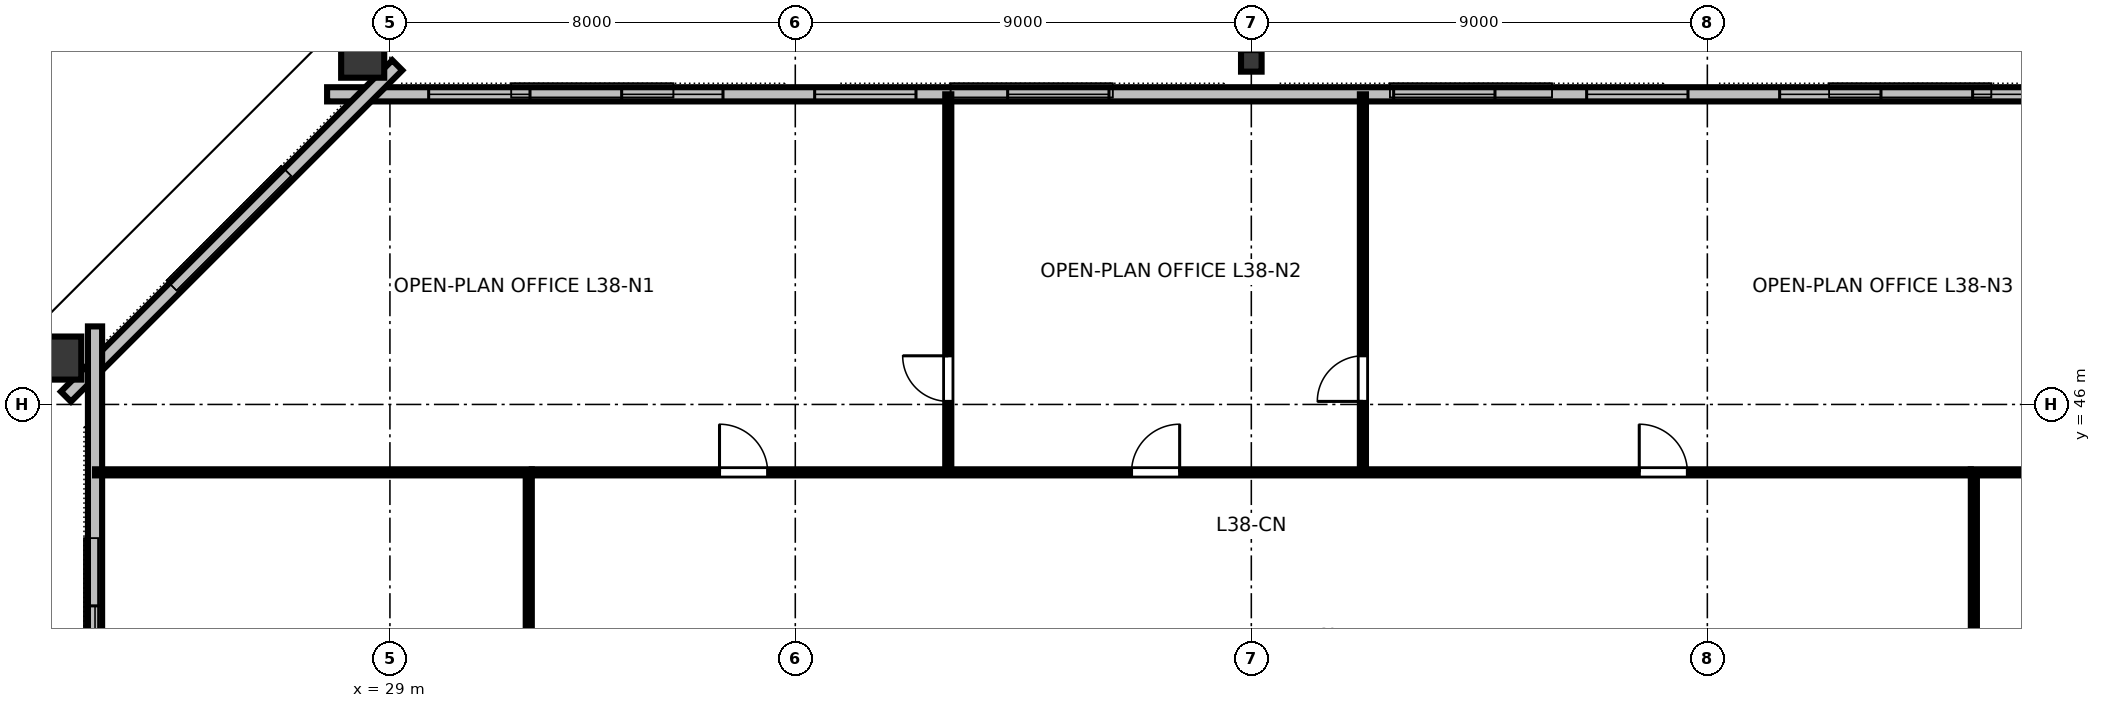
"""IFC4 building model, lengths in metres.
Left out: names, types, materials, properties, quantities, classifications, styles, units other than length and angle.
Written with IfcOpenShell. Run it as: python <this file> out.ifc"""

import sys

from ifc_helpers import new_model, si_unit, direction, frame, frame_2d, origin, origin_2d, place, context, subcontext, project, spatial, rectangle, hollow_rectangle, i_section, extrude, element, fill, save


model = new_model("IFC4")
c1 = context("Model", 3, precision=1e-05, world=origin(), true_north=direction((0.0, 1.0)))
c2 = subcontext(c1, "Body", "Model", "MODEL_VIEW")
j1 = project(units=[si_unit("LENGTHUNIT", "METRE"), si_unit("PLANEANGLEUNIT", "RADIAN")], contexts=[c1])
p1 = place(None, origin())
s1 = spatial("IfcSite", under=j1, at=p1, CompositionType="ELEMENT")
p2 = place(p1, origin())
s2 = spatial("IfcBuilding", under=s1, at=p2, CompositionType="ELEMENT")
p3 = place(p2, frame((0.0, 0.0, 145.6)))
s3 = spatial("IfcBuildingStorey", under=s2, at=p3, CompositionType="ELEMENT", Elevation=145.6)
p4 = place(p3, frame((46.0, 52.78, 0.0), z_axis=(0.0, 0.074245582927, 0.997239987874), x_axis=(-1.0, 0.0, 0.0)))
e1 = element("IfcColumn", 1, at=p4, inside=s3, PredefinedType="COLUMN", context=c2, shape_type="SweptSolid", body=[
    extrude(i_section(OverallWidth=0.406, OverallDepth=0.425, WebThickness=0.033, FlangeThickness=0.052, FilletRadius=0.025, at=origin_2d()), origin(), (0.0, 0.0, 1.0), 3.367),
])
p5 = place(p3, frame((28.462, 52.948, 0.0), z_axis=(-0.059277862286, 0.074043044101, 0.995491719033), x_axis=(-0.780645414878, -0.624974188451, 0.0)))
e2 = element("IfcColumn", 2, at=p5, inside=s3, PredefinedType="COLUMN", context=c2, shape_type="SweptSolid", body=[
    extrude(hollow_rectangle(XDim=0.85, YDim=1.0, WallThickness=0.05, at=origin_2d()), origin(), (0.0, 0.0, 1.0), 3.373),
])
p6 = place(p3, frame((22.409, 46.915, 0.0), z_axis=(-0.088840732105, 0.044637403672, 0.995045137927), x_axis=(0.889124879538, -0.446734568954, 0.099424209766)))
e3 = element("IfcColumn", 3, at=p6, inside=s3, PredefinedType="COLUMN", context=c2, shape_type="SweptSolid", body=[
    extrude(hollow_rectangle(XDim=0.85, YDim=1.0, WallThickness=0.05, at=origin_2d()), origin(), (0.0, 0.0, 1.0), 3.375),
])
p7 = place(p3, frame((64.24, 52.12, 0.0), z_axis=(0.0, 0.0, 1.0), x_axis=(-1.0, 0.0, 0.0)))
e4 = element("IfcWall", 4, at=p7, inside=s3, PredefinedType="STANDARD", context=c2, shape_type="SweptSolid", body=[
    extrude(rectangle(XDim=36.48, YDim=0.28, at=frame_2d((18.24, 0.0))), origin(), (0.0, 0.0, 1.0), 3.36),
])
p8 = place(p7, frame((2.004, 0.0, 0.8)))
e5 = element("IfcOpeningElement", 5, at=p8, cuts=e4, PredefinedType="OPENING", context=c2, shape_type="SweptSolid", body=[
    extrude(rectangle(XDim=2.0, YDim=1.95, at=frame_2d((1.0, 0.975))), frame((0.0, 0.15, 0.0), z_axis=(0.0, -1.0, 0.0), x_axis=(1.0, 0.0, 0.0)), (0.0, 0.0, 1.0), 0.3),
])
p9 = place(p7, frame((5.813, 0.0, 0.8)))
e6 = element("IfcOpeningElement", 6, at=p9, cuts=e4, PredefinedType="OPENING", context=c2, shape_type="SweptSolid", body=[
    extrude(rectangle(XDim=2.0, YDim=1.95, at=frame_2d((1.0, 0.975))), frame((0.0, 0.15, 0.0), z_axis=(0.0, -1.0, 0.0), x_axis=(1.0, 0.0, 0.0)), (0.0, 0.0, 1.0), 0.3),
])
p10 = place(p7, frame((9.622, 0.0, 0.8)))
e7 = element("IfcOpeningElement", 7, at=p10, cuts=e4, PredefinedType="OPENING", context=c2, shape_type="SweptSolid", body=[
    extrude(rectangle(XDim=2.0, YDim=1.95, at=frame_2d((1.0, 0.975))), frame((0.0, 0.15, 0.0), z_axis=(0.0, -1.0, 0.0), x_axis=(1.0, 0.0, 0.0)), (0.0, 0.0, 1.0), 0.3),
])
p11 = place(p7, frame((13.431, 0.0, 0.8)))
e8 = element("IfcOpeningElement", 8, at=p11, cuts=e4, PredefinedType="OPENING", context=c2, shape_type="SweptSolid", body=[
    extrude(rectangle(XDim=2.0, YDim=1.95, at=frame_2d((1.0, 0.975))), frame((0.0, 0.15, 0.0), z_axis=(0.0, -1.0, 0.0), x_axis=(1.0, 0.0, 0.0)), (0.0, 0.0, 1.0), 0.3),
])
p12 = place(p7, frame((21.049, 0.0, 0.8)))
e9 = element("IfcOpeningElement", 9, at=p12, cuts=e4, PredefinedType="OPENING", context=c2, shape_type="SweptSolid", body=[
    extrude(rectangle(XDim=2.0, YDim=1.95, at=frame_2d((1.0, 0.975))), frame((0.0, 0.15, 0.0), z_axis=(0.0, -1.0, 0.0), x_axis=(1.0, 0.0, 0.0)), (0.0, 0.0, 1.0), 0.3),
])
p13 = place(p7, frame((24.858, 0.0, 0.8)))
e10 = element("IfcOpeningElement", 10, at=p13, cuts=e4, PredefinedType="OPENING", context=c2, shape_type="SweptSolid", body=[
    extrude(rectangle(XDim=2.0, YDim=1.95, at=frame_2d((1.0, 0.975))), frame((0.0, 0.15, 0.0), z_axis=(0.0, -1.0, 0.0), x_axis=(1.0, 0.0, 0.0)), (0.0, 0.0, 1.0), 0.3),
])
p14 = place(p7, frame((28.667, 0.0, 0.8)))
e11 = element("IfcOpeningElement", 11, at=p14, cuts=e4, PredefinedType="OPENING", context=c2, shape_type="SweptSolid", body=[
    extrude(rectangle(XDim=2.0, YDim=1.95, at=frame_2d((1.0, 0.975))), frame((0.0, 0.15, 0.0), z_axis=(0.0, -1.0, 0.0), x_axis=(1.0, 0.0, 0.0)), (0.0, 0.0, 1.0), 0.3),
])
p15 = place(p7, frame((32.476, 0.0, 0.8)))
e12 = element("IfcOpeningElement", 12, at=p15, cuts=e4, PredefinedType="OPENING", context=c2, shape_type="SweptSolid", body=[
    extrude(rectangle(XDim=2.0, YDim=1.95, at=frame_2d((1.0, 0.975))), frame((0.0, 0.15, 0.0), z_axis=(0.0, -1.0, 0.0), x_axis=(1.0, 0.0, 0.0)), (0.0, 0.0, 1.0), 0.3),
])
p16 = place(p3, frame((29.146, 52.694, 0.0), z_axis=(0.0, 0.0, 1.0), x_axis=(-0.707106781187, -0.707106781187, 0.0)))
e13 = element("IfcWall", 13, at=p16, inside=s3, PredefinedType="STANDARD", context=c2, shape_type="SweptSolid", body=[
    extrude(rectangle(XDim=9.248, YDim=0.28, at=frame_2d((4.624, 0.0))), origin(), (0.0, 0.0, 1.0), 3.36),
])
p17 = place(p3, frame((23.18, 47.54, 0.0), z_axis=(0.0, 0.0, 1.0), x_axis=(0.0, -1.0, 0.0)))
e14 = element("IfcWall", 14, at=p17, inside=s3, PredefinedType="STANDARD", context=c2, shape_type="SweptSolid", body=[
    extrude(rectangle(XDim=31.08, YDim=0.28, at=frame_2d((15.54, 0.0))), origin(), (0.0, 0.0, 1.0), 3.36),
])
p18 = place(p17, frame((11.86, 0.0, 0.0)))
e15 = element("IfcOpeningElement", 15, at=p18, cuts=e14, PredefinedType="OPENING", context=c2, shape_type="SweptSolid", body=[
    extrude(rectangle(XDim=1.4, YDim=2.15, at=frame_2d((0.7, 1.075))), frame((0.0, 0.15, 0.0), z_axis=(0.0, -1.0, 0.0), x_axis=(1.0, 0.0, 0.0)), (0.0, 0.0, 1.0), 0.3),
])
p19 = place(p17, frame((5.515, 0.0, 0.8)))
e16 = element("IfcOpeningElement", 16, at=p19, cuts=e14, PredefinedType="OPENING", context=c2, shape_type="SweptSolid", body=[
    extrude(rectangle(XDim=2.0, YDim=1.95, at=frame_2d((1.0, 0.975))), frame((0.0, 0.15, 0.0), z_axis=(0.0, -1.0, 0.0), x_axis=(1.0, 0.0, 0.0)), (0.0, 0.0, 1.0), 0.3),
])
p20 = place(p17, frame((9.125, 0.0, 0.8)))
e17 = element("IfcOpeningElement", 17, at=p20, cuts=e14, PredefinedType="OPENING", context=c2, shape_type="SweptSolid", body=[
    extrude(rectangle(XDim=2.0, YDim=1.95, at=frame_2d((1.0, 0.975))), frame((0.0, 0.15, 0.0), z_axis=(0.0, -1.0, 0.0), x_axis=(1.0, 0.0, 0.0)), (0.0, 0.0, 1.0), 0.3),
])
p21 = place(p17, frame((19.955, 0.0, 0.8)))
e18 = element("IfcOpeningElement", 18, at=p21, cuts=e14, PredefinedType="OPENING", context=c2, shape_type="SweptSolid", body=[
    extrude(rectangle(XDim=2.0, YDim=1.95, at=frame_2d((1.0, 0.975))), frame((0.0, 0.15, 0.0), z_axis=(0.0, -1.0, 0.0), x_axis=(1.0, 0.0, 0.0)), (0.0, 0.0, 1.0), 0.3),
])
p22 = place(p17, frame((23.565, 0.0, 0.8)))
e19 = element("IfcOpeningElement", 19, at=p22, cuts=e14, PredefinedType="OPENING", context=c2, shape_type="SweptSolid", body=[
    extrude(rectangle(XDim=2.0, YDim=1.95, at=frame_2d((1.0, 0.975))), frame((0.0, 0.15, 0.0), z_axis=(0.0, -1.0, 0.0), x_axis=(1.0, 0.0, 0.0)), (0.0, 0.0, 1.0), 0.3),
])
p23 = place(p3, frame((40.019, 44.66, 0.0), z_axis=(0.0, 0.0, 1.0), x_axis=(0.0, 1.0, 0.0)))
e20 = element("IfcWall", 20, at=p23, inside=s3, PredefinedType="PARTITIONING", context=c2, shape_type="SweptSolid", body=[
    extrude(rectangle(XDim=7.46, YDim=0.12, at=frame_2d((3.73, 0.0))), origin(), (0.0, 0.0, 1.0), 2.64),
])
p24 = place(p23, frame((1.4, 0.0, 0.0)))
e21 = element("IfcOpeningElement", 21, at=p24, cuts=e20, PredefinedType="OPENING", context=c2, shape_type="SweptSolid", body=[
    extrude(rectangle(XDim=0.9, YDim=2.15, at=frame_2d((0.45, 1.075))), frame((0.0, 0.07, 0.0), z_axis=(0.0, -1.0, 0.0), x_axis=(1.0, 0.0, 0.0)), (0.0, 0.0, 1.0), 0.14),
])
p25 = place(p3, frame((48.202, 44.66, 0.0), z_axis=(0.0, 0.0, 1.0), x_axis=(0.0, 1.0, 0.0)))
e22 = element("IfcWall", 22, at=p25, inside=s3, PredefinedType="PARTITIONING", context=c2, shape_type="SweptSolid", body=[
    extrude(rectangle(XDim=7.46, YDim=0.12, at=frame_2d((3.73, 0.0))), origin(), (0.0, 0.0, 1.0), 2.64),
])
p26 = place(p25, frame((1.4, 0.0, 0.0)))
e23 = element("IfcOpeningElement", 23, at=p26, cuts=e22, PredefinedType="OPENING", context=c2, shape_type="SweptSolid", body=[
    extrude(rectangle(XDim=0.9, YDim=2.15, at=frame_2d((0.45, 1.075))), frame((0.0, 0.07, 0.0), z_axis=(0.0, -1.0, 0.0), x_axis=(1.0, 0.0, 0.0)), (0.0, 0.0, 1.0), 0.14),
])
p27 = place(p3, frame((31.8, 44.66, 0.0), z_axis=(0.0, 0.0, 1.0), x_axis=(1.0, 0.0, 0.0)))
e24 = element("IfcWall", 24, at=p27, inside=s3, PredefinedType="PARTITIONING", context=c2, shape_type="SweptSolid", body=[
    extrude(rectangle(XDim=28.4, YDim=0.12, at=frame_2d((14.2, 0.0))), origin(), (0.0, 0.0, 1.0), 2.64),
])
p28 = place(p27, frame((3.705, 0.0, 0.0)))
e25 = element("IfcOpeningElement", 25, at=p28, cuts=e24, PredefinedType="OPENING", context=c2, shape_type="SweptSolid", body=[
    extrude(rectangle(XDim=0.95, YDim=2.15, at=frame_2d((0.475, 1.075))), frame((0.0, 0.07, 0.0), z_axis=(0.0, -1.0, 0.0), x_axis=(1.0, 0.0, 0.0)), (0.0, 0.0, 1.0), 0.14),
])
p29 = place(p27, frame((11.836, 0.0, 0.0)))
e26 = element("IfcOpeningElement", 26, at=p29, cuts=e24, PredefinedType="OPENING", context=c2, shape_type="SweptSolid", body=[
    extrude(rectangle(XDim=0.95, YDim=2.15, at=frame_2d((0.475, 1.075))), frame((0.0, 0.07, 0.0), z_axis=(0.0, -1.0, 0.0), x_axis=(1.0, 0.0, 0.0)), (0.0, 0.0, 1.0), 0.14),
])
p30 = place(p27, frame((21.856, 0.0, 0.0)))
e27 = element("IfcOpeningElement", 27, at=p30, cuts=e24, PredefinedType="OPENING", context=c2, shape_type="SweptSolid", body=[
    extrude(rectangle(XDim=0.95, YDim=2.15, at=frame_2d((0.475, 1.075))), frame((0.0, 0.07, 0.0), z_axis=(0.0, -1.0, 0.0), x_axis=(1.0, 0.0, 0.0)), (0.0, 0.0, 1.0), 0.14),
])
p31 = place(p3, frame((31.74, 33.02, 0.0), z_axis=(0.0, 0.0, 1.0), x_axis=(0.0, 1.0, 0.0)))
e28 = element("IfcWall", 28, at=p31, inside=s3, PredefinedType="PARTITIONING", context=c2, shape_type="SweptSolid", body=[
    extrude(rectangle(XDim=11.58, YDim=0.12, at=frame_2d((5.79, 0.0))), origin(), (0.0, 0.0, 1.0), 2.64),
])
p32 = place(p31, frame((5.215, 0.0, 0.0)))
e29 = element("IfcOpeningElement", 29, at=p32, cuts=e28, PredefinedType="OPENING", context=c2, shape_type="SweptSolid", body=[
    extrude(rectangle(XDim=0.95, YDim=2.15, at=frame_2d((0.475, 1.075))), frame((0.0, 0.07, 0.0), z_axis=(0.0, -1.0, 0.0), x_axis=(1.0, 0.0, 0.0)), (0.0, 0.0, 1.0), 0.14),
])
p33 = place(p3, frame((60.26, 33.02, 0.0), z_axis=(0.0, 0.0, 1.0), x_axis=(0.0, 1.0, 0.0)))
e30 = element("IfcWall", 30, at=p33, inside=s3, PredefinedType="PARTITIONING", context=c2, shape_type="SweptSolid", body=[
    extrude(rectangle(XDim=11.58, YDim=0.12, at=frame_2d((5.79, 0.0))), origin(), (0.0, 0.0, 1.0), 2.64),
])
p34 = place(p33, frame((5.775, 0.0, 0.0)))
e31 = element("IfcOpeningElement", 31, at=p34, cuts=e30, PredefinedType="OPENING", context=c2, shape_type="SweptSolid", body=[
    extrude(rectangle(XDim=0.95, YDim=2.15, at=frame_2d((0.475, 1.075))), frame((0.0, 0.07, 0.0), z_axis=(0.0, -1.0, 0.0), x_axis=(1.0, 0.0, 0.0)), (0.0, 0.0, 1.0), 0.14),
])
for number, where, z_axis, x_axis in (
    (32, (31.8, 44.66, 0.0), (0.0, 0.0, 1.0), (-1.0, 0.0, 0.0)),
    (33, (60.2, 44.66, 0.0), (0.0, 0.0, 1.0), (1.0, 0.0, 0.0)),
):
    element("IfcWall", number, at=place(p3, frame(where, z_axis=z_axis, x_axis=x_axis)), inside=s3, PredefinedType="PARTITIONING", context=c2, shape_type="SweptSolid", body=[
        extrude(rectangle(XDim=8.62, YDim=0.12, at=frame_2d((4.31, 0.0))), origin(), (0.0, 0.0, 1.0), 2.64),
    ])
p35 = place(p8, origin())
e34 = element("IfcWindow", 34, at=p35, inside=s3, PartitioningType="SINGLE_PANEL", PredefinedType="WINDOW", context=c2, shape_type="SweptSolid", body=[
    extrude(rectangle(XDim=2.0, YDim=1.95, at=frame_2d((1.0, 0.975))), frame((0.0, 0.03, 0.0), z_axis=(0.0, -1.0, 0.0), x_axis=(1.0, 0.0, 0.0)), (0.0, 0.0, 1.0), 0.06),
])
fill(e5, e34)
p36 = place(p9, origin())
e35 = element("IfcWindow", 35, at=p36, inside=s3, PartitioningType="SINGLE_PANEL", PredefinedType="WINDOW", context=c2, shape_type="SweptSolid", body=[
    extrude(rectangle(XDim=2.0, YDim=1.95, at=frame_2d((1.0, 0.975))), frame((0.0, 0.03, 0.0), z_axis=(0.0, -1.0, 0.0), x_axis=(1.0, 0.0, 0.0)), (0.0, 0.0, 1.0), 0.06),
])
fill(e6, e35)
p37 = place(p10, origin())
e36 = element("IfcWindow", 36, at=p37, inside=s3, PartitioningType="SINGLE_PANEL", PredefinedType="WINDOW", context=c2, shape_type="SweptSolid", body=[
    extrude(rectangle(XDim=2.0, YDim=1.95, at=frame_2d((1.0, 0.975))), frame((0.0, 0.03, 0.0), z_axis=(0.0, -1.0, 0.0), x_axis=(1.0, 0.0, 0.0)), (0.0, 0.0, 1.0), 0.06),
])
fill(e7, e36)
p38 = place(p11, origin())
e37 = element("IfcWindow", 37, at=p38, inside=s3, PartitioningType="SINGLE_PANEL", PredefinedType="WINDOW", context=c2, shape_type="SweptSolid", body=[
    extrude(rectangle(XDim=2.0, YDim=1.95, at=frame_2d((1.0, 0.975))), frame((0.0, 0.03, 0.0), z_axis=(0.0, -1.0, 0.0), x_axis=(1.0, 0.0, 0.0)), (0.0, 0.0, 1.0), 0.06),
])
fill(e8, e37)
p39 = place(p12, origin())
e38 = element("IfcWindow", 38, at=p39, inside=s3, PartitioningType="SINGLE_PANEL", PredefinedType="WINDOW", context=c2, shape_type="SweptSolid", body=[
    extrude(rectangle(XDim=2.0, YDim=1.95, at=frame_2d((1.0, 0.975))), frame((0.0, 0.03, 0.0), z_axis=(0.0, -1.0, 0.0), x_axis=(1.0, 0.0, 0.0)), (0.0, 0.0, 1.0), 0.06),
])
fill(e9, e38)
p40 = place(p13, origin())
e39 = element("IfcWindow", 39, at=p40, inside=s3, PartitioningType="SINGLE_PANEL", PredefinedType="WINDOW", context=c2, shape_type="SweptSolid", body=[
    extrude(rectangle(XDim=2.0, YDim=1.95, at=frame_2d((1.0, 0.975))), frame((0.0, 0.03, 0.0), z_axis=(0.0, -1.0, 0.0), x_axis=(1.0, 0.0, 0.0)), (0.0, 0.0, 1.0), 0.06),
])
fill(e10, e39)
p41 = place(p14, origin())
e40 = element("IfcWindow", 40, at=p41, inside=s3, PartitioningType="SINGLE_PANEL", PredefinedType="WINDOW", context=c2, shape_type="SweptSolid", body=[
    extrude(rectangle(XDim=2.0, YDim=1.95, at=frame_2d((1.0, 0.975))), frame((0.0, 0.03, 0.0), z_axis=(0.0, -1.0, 0.0), x_axis=(1.0, 0.0, 0.0)), (0.0, 0.0, 1.0), 0.06),
])
fill(e11, e40)
p42 = place(p15, origin())
e41 = element("IfcWindow", 41, at=p42, inside=s3, PartitioningType="SINGLE_PANEL", PredefinedType="WINDOW", context=c2, shape_type="SweptSolid", body=[
    extrude(rectangle(XDim=2.0, YDim=1.95, at=frame_2d((1.0, 0.975))), frame((0.0, 0.03, 0.0), z_axis=(0.0, -1.0, 0.0), x_axis=(1.0, 0.0, 0.0)), (0.0, 0.0, 1.0), 0.06),
])
fill(e12, e41)
p43 = place(p19, origin())
e42 = element("IfcWindow", 42, at=p43, inside=s3, PartitioningType="SINGLE_PANEL", PredefinedType="WINDOW", context=c2, shape_type="SweptSolid", body=[
    extrude(rectangle(XDim=2.0, YDim=1.95, at=frame_2d((1.0, 0.975))), frame((0.0, 0.03, 0.0), z_axis=(0.0, -1.0, 0.0), x_axis=(1.0, 0.0, 0.0)), (0.0, 0.0, 1.0), 0.06),
])
fill(e16, e42)
p44 = place(p24, origin())
e43 = element("IfcDoor", 43, at=p44, inside=s3, OperationType="SINGLE_SWING_RIGHT", PredefinedType="DOOR", context=c2, shape_type="SweptSolid", body=[
    extrude(rectangle(XDim=0.9, YDim=2.15, at=frame_2d((0.45, 1.075))), frame((0.0, 0.025, 0.0), z_axis=(0.0, -1.0, 0.0), x_axis=(1.0, 0.0, 0.0)), (0.0, 0.0, 1.0), 0.05),
])
fill(e21, e43)
p45 = place(p26, origin())
e44 = element("IfcDoor", 44, at=p45, inside=s3, OperationType="SINGLE_SWING_LEFT", PredefinedType="DOOR", context=c2, shape_type="SweptSolid", body=[
    extrude(rectangle(XDim=0.9, YDim=2.15, at=frame_2d((0.45, 1.075))), frame((0.0, 0.025, 0.0), z_axis=(0.0, -1.0, 0.0), x_axis=(1.0, 0.0, 0.0)), (0.0, 0.0, 1.0), 0.05),
])
fill(e23, e44)
p46 = place(p28, origin())
e45 = element("IfcDoor", 45, at=p46, inside=s3, OperationType="SINGLE_SWING_LEFT", PredefinedType="DOOR", context=c2, shape_type="SweptSolid", body=[
    extrude(rectangle(XDim=0.95, YDim=2.15, at=frame_2d((0.475, 1.075))), frame((0.0, 0.025, 0.0), z_axis=(0.0, -1.0, 0.0), x_axis=(1.0, 0.0, 0.0)), (0.0, 0.0, 1.0), 0.05),
])
fill(e25, e45)
p47 = place(p29, origin())
e46 = element("IfcDoor", 46, at=p47, inside=s3, OperationType="SINGLE_SWING_RIGHT", PredefinedType="DOOR", context=c2, shape_type="SweptSolid", body=[
    extrude(rectangle(XDim=0.95, YDim=2.15, at=frame_2d((0.475, 1.075))), frame((0.0, 0.025, 0.0), z_axis=(0.0, -1.0, 0.0), x_axis=(1.0, 0.0, 0.0)), (0.0, 0.0, 1.0), 0.05),
])
fill(e26, e46)
p48 = place(p30, origin())
e47 = element("IfcDoor", 47, at=p48, inside=s3, OperationType="SINGLE_SWING_LEFT", PredefinedType="DOOR", context=c2, shape_type="SweptSolid", body=[
    extrude(rectangle(XDim=0.95, YDim=2.15, at=frame_2d((0.475, 1.075))), frame((0.0, 0.025, 0.0), z_axis=(0.0, -1.0, 0.0), x_axis=(1.0, 0.0, 0.0)), (0.0, 0.0, 1.0), 0.05),
])
fill(e27, e47)
save(model, sys.argv[1])
